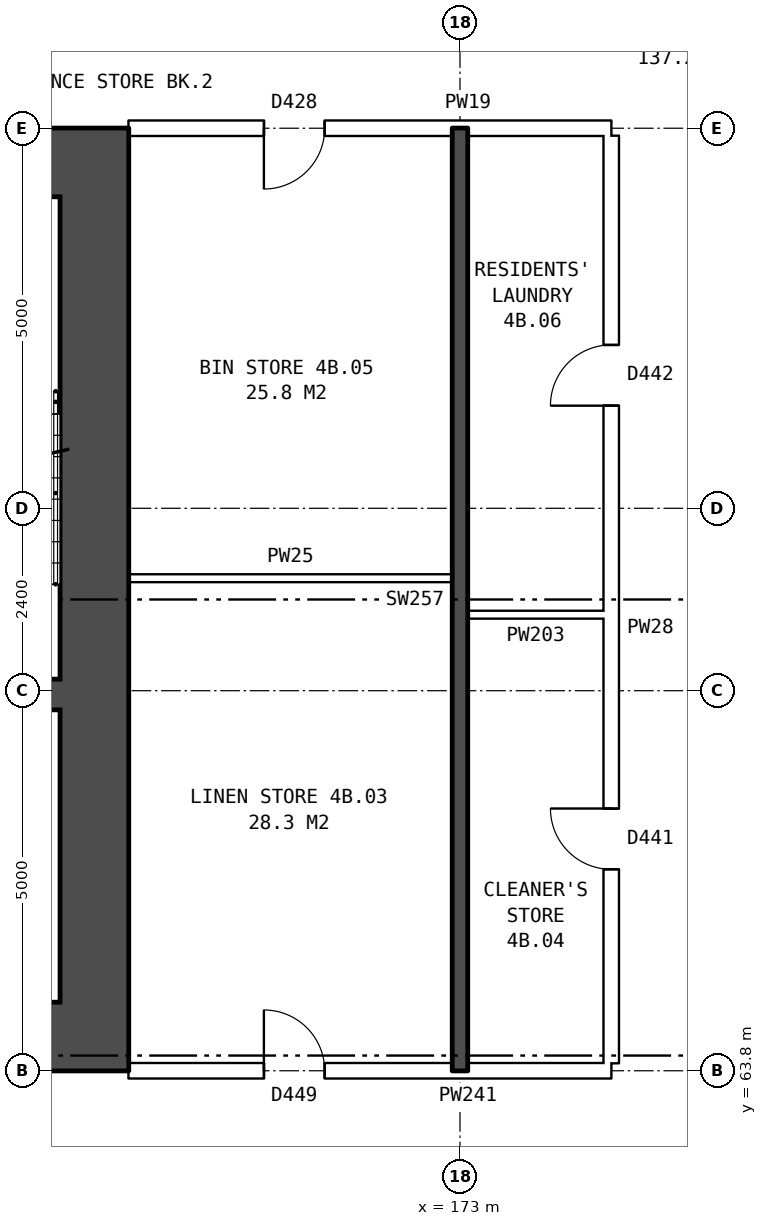
"""IFC4 building model, lengths in metres.
Left out: names, types, materials, properties, quantities, classifications, styles, units other than length and angle.
Written with IfcOpenShell. Run it as: python <this file> out.ifc"""

import sys

from ifc_helpers import new_model, si_unit, direction, frame, frame_2d, origin, place, context, subcontext, project, spatial, rectangle, extrude, element, fill, save


model = new_model("IFC4")
c1 = context("Model", 3, precision=1e-05, world=origin(), true_north=direction((0.0, 1.0)))
c2 = subcontext(c1, "Body", "Model", "MODEL_VIEW")
j1 = project(units=[si_unit("LENGTHUNIT", "METRE"), si_unit("PLANEANGLEUNIT", "RADIAN")], contexts=[c1])
p1 = place(None, origin())
s1 = spatial("IfcSite", under=j1, at=p1, CompositionType="ELEMENT")
p2 = place(p1, origin())
s2 = spatial("IfcBuilding", under=s1, at=p2, CompositionType="ELEMENT")
p3 = place(p2, frame((0.0, 0.0, 19.5)))
s3 = spatial("IfcBuildingStorey", under=s2, at=p3, CompositionType="ELEMENT", Elevation=19.5)
p4 = place(p3, frame((168.19, 75.3, 0.0), z_axis=(0.0, 0.0, 1.0), x_axis=(0.0, -1.0, 0.0)))
e1 = element("IfcWall", 1, at=p4, inside=s3, PredefinedType="SHEAR", context=c2, shape_type="SweptSolid", body=[
    extrude(rectangle(XDim=10.6, YDim=0.9, at=frame_2d((5.3, 0.0))), origin(), (0.0, 0.0, 1.0), 2.85),
])
for number, where, z_axis, x_axis in (
    (2, (160.24, 75.75, 0.0), (0.0, 0.0, 1.0), (1.0, 0.0, 0.0)),
    (3, (160.24, 64.25, 0.0), (0.0, 0.0, 1.0), (1.0, 0.0, 0.0)),
):
    element("IfcWall", number, at=place(p3, frame(where, z_axis=z_axis, x_axis=x_axis)), inside=s3, PredefinedType="SHEAR", context=c2, shape_type="SweptSolid", body=[
        extrude(rectangle(XDim=8.4, YDim=0.9, at=frame_2d((4.2, 0.0))), origin(), (0.0, 0.0, 1.0), 2.85),
    ])
p5 = place(p3, frame((161.14, 68.75, 0.0), z_axis=(0.0, 0.0, 1.0), x_axis=(1.0, 0.0, 0.0)))
e4 = element("IfcWall", 4, at=p5, inside=s3, PredefinedType="SHEAR", context=c2, shape_type="SweptSolid", body=[
    extrude(rectangle(XDim=6.6, YDim=0.4, at=frame_2d((3.3, 0.0))), origin(), (0.0, 0.0, 1.0), 2.85),
])
p6 = place(p5, frame((4.25, 0.0, 0.0)))
e5 = element("IfcOpeningElement", 5, at=p6, cuts=e4, PredefinedType="OPENING", context=c2, shape_type="SweptSolid", body=[
    extrude(rectangle(XDim=1.1, YDim=2.1, at=frame_2d((0.55, 1.05))), frame((0.0, 0.21, 0.0), z_axis=(0.0, -1.0, 0.0), x_axis=(1.0, 0.0, 0.0)), (0.0, 0.0, 1.0), 0.42),
])
p7 = place(p5, frame((2.6, 0.0, 0.0)))
e6 = element("IfcOpeningElement", 6, at=p7, cuts=e4, PredefinedType="OPENING", context=c2, shape_type="SweptSolid", body=[
    extrude(rectangle(XDim=0.85, YDim=2.1, at=frame_2d((0.425, 1.05))), frame((0.0, 0.21, 0.0), z_axis=(0.0, -1.0, 0.0), x_axis=(1.0, 0.0, 0.0)), (0.0, 0.0, 1.0), 0.42),
])
p8 = place(p3, frame((168.64, 63.8, 0.0), z_axis=(0.0, 0.0, 1.0), x_axis=(1.0, 0.0, 0.0)))
e7 = element("IfcWall", 7, at=p8, inside=s3, PredefinedType="PARTITIONING", context=c2, shape_type="SweptSolid", body=[
    extrude(rectangle(XDim=6.35, YDim=0.2, at=frame_2d((3.175, 0.0))), origin(), (0.0, 0.0, 1.0), 2.85),
])
p9 = place(p8, frame((1.78, 0.0, 0.0)))
e8 = element("IfcOpeningElement", 8, at=p9, cuts=e7, PredefinedType="OPENING", context=c2, shape_type="SweptSolid", body=[
    extrude(rectangle(XDim=0.8, YDim=2.1, at=frame_2d((0.4, 1.05))), frame((0.0, 0.11, 0.0), z_axis=(0.0, -1.0, 0.0), x_axis=(1.0, 0.0, 0.0)), (0.0, 0.0, 1.0), 0.22),
])
p10 = place(p3, frame((173.1, 69.8, 0.0), z_axis=(0.0, 0.0, 1.0), x_axis=(1.0, 0.0, 0.0)))
e9 = element("IfcWall", 9, at=p10, inside=s3, PredefinedType="PARTITIONING", context=c2, shape_type="SweptSolid", body=[
    extrude(rectangle(XDim=1.79, YDim=0.1, at=frame_2d((0.895, 0.0))), origin(), (0.0, 0.0, 1.0), 2.85),
])
p11 = place(p3, frame((168.64, 70.28, 0.0), z_axis=(0.0, 0.0, 1.0), x_axis=(1.0, 0.0, 0.0)))
e10 = element("IfcWall", 10, at=p11, inside=s3, PredefinedType="PARTITIONING", context=c2, shape_type="SweptSolid", body=[
    extrude(rectangle(XDim=4.26, YDim=0.1, at=frame_2d((2.13, 0.0))), origin(), (0.0, 0.0, 1.0), 2.85),
])
p12 = place(p3, frame((168.64, 76.2, 0.0), z_axis=(0.0, 0.0, 1.0), x_axis=(1.0, 0.0, 0.0)))
e11 = element("IfcWall", 11, at=p12, inside=s3, PredefinedType="PARTITIONING", context=c2, shape_type="SweptSolid", body=[
    extrude(rectangle(XDim=6.35, YDim=0.2, at=frame_2d((3.175, 0.0))), origin(), (0.0, 0.0, 1.0), 2.85),
])
p13 = place(p12, frame((1.78, 0.0, 0.0)))
e12 = element("IfcOpeningElement", 12, at=p13, cuts=e11, PredefinedType="OPENING", context=c2, shape_type="SweptSolid", body=[
    extrude(rectangle(XDim=0.8, YDim=2.1, at=frame_2d((0.4, 1.05))), frame((0.0, 0.11, 0.0), z_axis=(0.0, -1.0, 0.0), x_axis=(1.0, 0.0, 0.0)), (0.0, 0.0, 1.0), 0.22),
])
p14 = place(p3, frame((173.0, 63.8, 0.0), z_axis=(0.0, 0.0, 1.0), x_axis=(0.0, 1.0, 0.0)))
e13 = element("IfcWall", 13, at=p14, inside=s3, PredefinedType="SOLIDWALL", context=c2, shape_type="SweptSolid", body=[
    extrude(rectangle(XDim=12.4, YDim=0.2, at=frame_2d((6.2, 0.0))), origin(), (0.0, 0.0, 1.0), 2.85),
])
p15 = place(p3, frame((174.99, 63.9, 0.0), z_axis=(0.0, 0.0, 1.0), x_axis=(0.0, 1.0, 0.0)))
e14 = element("IfcWall", 14, at=p15, inside=s3, PredefinedType="PARTITIONING", context=c2, shape_type="SweptSolid", body=[
    extrude(rectangle(XDim=12.2, YDim=0.2, at=frame_2d((6.1, 0.0))), origin(), (0.0, 0.0, 1.0), 2.85),
])
p16 = place(p15, frame((2.55, 0.0, 0.0)))
e15 = element("IfcOpeningElement", 15, at=p16, cuts=e14, PredefinedType="OPENING", context=c2, shape_type="SweptSolid", body=[
    extrude(rectangle(XDim=0.8, YDim=2.1, at=frame_2d((0.4, 1.05))), frame((0.0, 0.11, 0.0), z_axis=(0.0, -1.0, 0.0), x_axis=(1.0, 0.0, 0.0)), (0.0, 0.0, 1.0), 0.22),
])
p17 = place(p15, frame((8.65, 0.0, 0.0)))
e16 = element("IfcOpeningElement", 16, at=p17, cuts=e14, PredefinedType="OPENING", context=c2, shape_type="SweptSolid", body=[
    extrude(rectangle(XDim=0.8, YDim=2.1, at=frame_2d((0.4, 1.05))), frame((0.0, 0.11, 0.0), z_axis=(0.0, -1.0, 0.0), x_axis=(1.0, 0.0, 0.0)), (0.0, 0.0, 1.0), 0.22),
])
p18 = place(p9, origin())
e17 = element("IfcDoor", 17, at=p18, inside=s3, OperationType="SINGLE_SWING_LEFT", PredefinedType="DOOR", context=c2, shape_type="SweptSolid", body=[
    extrude(rectangle(XDim=0.8, YDim=2.1, at=frame_2d((0.4, 1.05))), frame((0.0, 0.025, 0.0), z_axis=(0.0, -1.0, 0.0), x_axis=(1.0, 0.0, 0.0)), (0.0, 0.0, 1.0), 0.05),
])
fill(e8, e17)
p19 = place(p16, origin())
e18 = element("IfcDoor", 18, at=p19, inside=s3, OperationType="SINGLE_SWING_RIGHT", PredefinedType="DOOR", context=c2, shape_type="SweptSolid", body=[
    extrude(rectangle(XDim=0.8, YDim=2.1, at=frame_2d((0.4, 1.05))), frame((0.0, 0.025, 0.0), z_axis=(0.0, -1.0, 0.0), x_axis=(1.0, 0.0, 0.0)), (0.0, 0.0, 1.0), 0.05),
])
fill(e15, e18)
p20 = place(p13, frame((0.8, 0.0, 0.0), z_axis=(0.0, 0.0, 1.0), x_axis=(-1.0, 0.0, 0.0)))
e19 = element("IfcDoor", 19, at=p20, inside=s3, OperationType="SINGLE_SWING_RIGHT", PredefinedType="DOOR", context=c2, shape_type="SweptSolid", body=[
    extrude(rectangle(XDim=0.8, YDim=2.1, at=frame_2d((0.4, 1.05))), frame((0.0, 0.025, 0.0), z_axis=(0.0, -1.0, 0.0), x_axis=(1.0, 0.0, 0.0)), (0.0, 0.0, 1.0), 0.05),
])
fill(e12, e19)
p21 = place(p17, origin())
e20 = element("IfcDoor", 20, at=p21, inside=s3, OperationType="SINGLE_SWING_LEFT", PredefinedType="DOOR", context=c2, shape_type="SweptSolid", body=[
    extrude(rectangle(XDim=0.8, YDim=2.1, at=frame_2d((0.4, 1.05))), frame((0.0, 0.025, 0.0), z_axis=(0.0, -1.0, 0.0), x_axis=(1.0, 0.0, 0.0)), (0.0, 0.0, 1.0), 0.05),
])
fill(e16, e20)
save(model, sys.argv[1])
